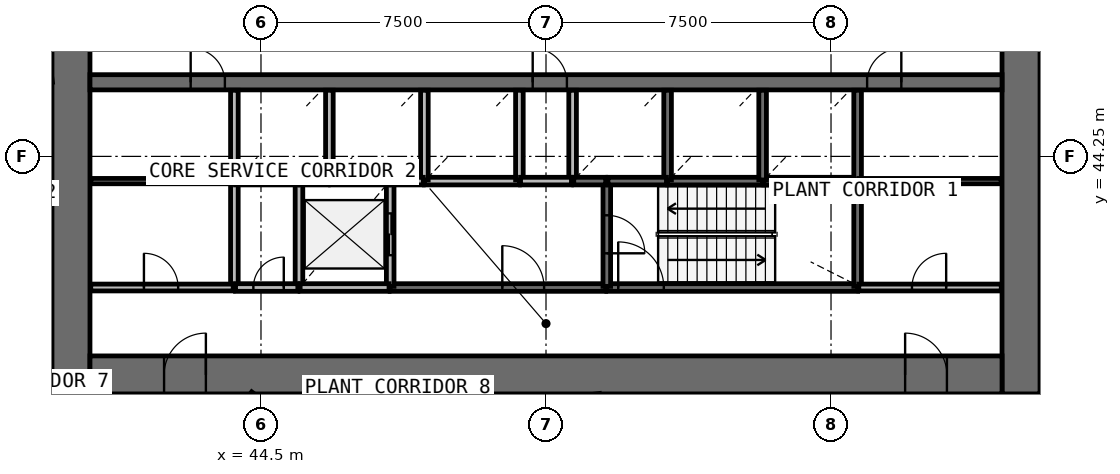
"""IFC4 building model, lengths in metres.
Left out: names, types, materials, properties, quantities, classifications, styles, units other than length and angle.
Written with IfcOpenShell. Run it as: python <this file> out.ifc"""

import sys

from ifc_helpers import new_model, si_unit, direction, frame, frame_2d, origin, place, context, subcontext, project, spatial, rectangle, extrude, source, transform, mapped, element, fill, save


model = new_model("IFC4")
c1 = context("Model", 3, precision=1e-05, world=origin(), true_north=direction((0.0, 1.0)))
c2 = subcontext(c1, "Body", "Model", "MODEL_VIEW")
j1 = project(units=[si_unit("LENGTHUNIT", "METRE"), si_unit("PLANEANGLEUNIT", "RADIAN")], contexts=[c1])
p1 = place(None, origin())
s1 = spatial("IfcSite", under=j1, at=p1, CompositionType="ELEMENT")
p2 = place(p1, origin())
s2 = spatial("IfcBuilding", under=s1, at=p2, CompositionType="ELEMENT")
p3 = place(p2, frame((0.0, 0.0, 75.4)))
s3 = spatial("IfcBuildingStorey", under=s2, at=p3, CompositionType="ELEMENT", Elevation=75.4)
p4 = place(p3, frame((64.5, 38.0, 0.0), z_axis=(0.0, 0.0, 1.0), x_axis=(0.0, 1.0, 0.0)))
e1 = element("IfcWall", 1, at=p4, inside=s3, PredefinedType="SHEAR", context=c2, shape_type="SweptSolid", body=[
    extrude(rectangle(XDim=20.0, YDim=1.0, at=frame_2d((10.0, 0.0))), origin(), (0.0, 0.0, 1.0), 4.4),
])
p5 = place(p4, frame((9.1, 0.0, 0.0)))
e2 = element("IfcOpeningElement", 2, at=p5, cuts=e1, PredefinedType="OPENING", context=c2, shape_type="SweptSolid", body=[
    extrude(rectangle(XDim=1.8, YDim=2.1, at=frame_2d((0.9, 1.05))), frame((0.0, 0.51, 0.0), z_axis=(0.0, -1.0, 0.0), x_axis=(1.0, 0.0, 0.0)), (0.0, 0.0, 1.0), 1.02),
])
p6 = place(p3, frame((39.5, 58.0, 0.0), z_axis=(0.0, 0.0, 1.0), x_axis=(0.0, -1.0, 0.0)))
e3 = element("IfcWall", 3, at=p6, inside=s3, PredefinedType="SHEAR", context=c2, shape_type="SweptSolid", body=[
    extrude(rectangle(XDim=20.0, YDim=1.0, at=frame_2d((10.0, 0.0))), origin(), (0.0, 0.0, 1.0), 4.4),
])
p7 = place(p6, frame((9.1, 0.0, 0.0)))
e4 = element("IfcOpeningElement", 4, at=p7, cuts=e3, PredefinedType="OPENING", context=c2, shape_type="SweptSolid", body=[
    extrude(rectangle(XDim=1.8, YDim=2.1, at=frame_2d((0.9, 1.05))), frame((0.0, 0.51, 0.0), z_axis=(0.0, -1.0, 0.0), x_axis=(1.0, 0.0, 0.0)), (0.0, 0.0, 1.0), 1.02),
])
p8 = place(p3, frame((40.0, 38.5, 0.0), z_axis=(0.0, 0.0, 1.0), x_axis=(1.0, 0.0, 0.0)))
e5 = element("IfcWall", 5, at=p8, inside=s3, PredefinedType="SHEAR", context=c2, shape_type="SweptSolid", body=[
    extrude(rectangle(XDim=24.0, YDim=1.0, at=frame_2d((12.0, 0.0))), origin(), (0.0, 0.0, 1.0), 4.4),
])
p9 = place(p8, frame((21.45, 0.0, 0.0)))
e6 = element("IfcOpeningElement", 6, at=p9, cuts=e5, PredefinedType="OPENING", context=c2, shape_type="SweptSolid", body=[
    extrude(rectangle(XDim=1.1, YDim=2.1, at=frame_2d((0.55, 1.05))), frame((0.0, 0.51, 0.0), z_axis=(0.0, -1.0, 0.0), x_axis=(1.0, 0.0, 0.0)), (0.0, 0.0, 1.0), 1.02),
])
p10 = place(p8, frame((1.95, 0.0, 0.0)))
e7 = element("IfcOpeningElement", 7, at=p10, cuts=e5, PredefinedType="OPENING", context=c2, shape_type="SweptSolid", body=[
    extrude(rectangle(XDim=1.1, YDim=2.1, at=frame_2d((0.55, 1.05))), frame((0.0, 0.51, 0.0), z_axis=(0.0, -1.0, 0.0), x_axis=(1.0, 0.0, 0.0)), (0.0, 0.0, 1.0), 1.02),
])
p11 = place(p3, frame((40.0, 46.2, 0.0), z_axis=(0.0, 0.0, 1.0), x_axis=(1.0, 0.0, 0.0)))
e8 = element("IfcWall", 8, at=p11, inside=s3, PredefinedType="SHEAR", context=c2, shape_type="SweptSolid", body=[
    extrude(rectangle(XDim=24.0, YDim=0.4, at=frame_2d((12.0, 0.0))), origin(), (0.0, 0.0, 1.0), 4.4),
])
p12 = place(p11, frame((20.45, 0.0, 0.0)))
e9 = element("IfcOpeningElement", 9, at=p12, cuts=e8, PredefinedType="OPENING", context=c2, shape_type="SweptSolid", body=[
    extrude(rectangle(XDim=0.9, YDim=2.1, at=frame_2d((0.45, 1.05))), frame((0.0, 0.21, 0.0), z_axis=(0.0, -1.0, 0.0), x_axis=(1.0, 0.0, 0.0)), (0.0, 0.0, 1.0), 0.42),
])
p13 = place(p11, frame((2.65, 0.0, 0.0)))
e10 = element("IfcOpeningElement", 10, at=p13, cuts=e8, PredefinedType="OPENING", context=c2, shape_type="SweptSolid", body=[
    extrude(rectangle(XDim=0.9, YDim=2.1, at=frame_2d((0.45, 1.05))), frame((0.0, 0.21, 0.0), z_axis=(0.0, -1.0, 0.0), x_axis=(1.0, 0.0, 0.0)), (0.0, 0.0, 1.0), 0.42),
])
p14 = place(p11, frame((11.65, 0.0, 0.0)))
e11 = element("IfcOpeningElement", 11, at=p14, cuts=e8, PredefinedType="OPENING", context=c2, shape_type="SweptSolid", body=[
    extrude(rectangle(XDim=0.9, YDim=2.1, at=frame_2d((0.45, 1.05))), frame((0.0, 0.21, 0.0), z_axis=(0.0, -1.0, 0.0), x_axis=(1.0, 0.0, 0.0)), (0.0, 0.0, 1.0), 0.42),
])
p15 = place(p3, frame((53.6, 40.8, 0.0), z_axis=(0.0, 0.0, 1.0), x_axis=(1.0, 0.0, 0.0)))
e12 = element("IfcWall", 12, at=p15, inside=s3, PredefinedType="SOLIDWALL", context=c2, shape_type="SweptSolid", body=[
    extrude(rectangle(XDim=6.6, YDim=0.2, at=frame_2d((3.3, 0.0))), origin(), (0.0, 0.0, 1.0), 4.0),
])
p16 = place(p15, frame((0.3, 0.0, 0.0)))
e13 = element("IfcOpeningElement", 13, at=p16, cuts=e12, PredefinedType="OPENING", context=c2, shape_type="SweptSolid", body=[
    extrude(rectangle(XDim=1.2, YDim=2.1, at=frame_2d((0.6, 1.05))), frame((0.0, 0.11, 0.0), z_axis=(0.0, -1.0, 0.0), x_axis=(1.0, 0.0, 0.0)), (0.0, 0.0, 1.0), 0.22),
])
p17 = place(p3, frame((47.9, 40.8, 0.0), z_axis=(0.0, 0.0, 1.0), x_axis=(1.0, 0.0, 0.0)))
e14 = element("IfcWall", 14, at=p17, inside=s3, PredefinedType="SOLIDWALL", context=c2, shape_type="SweptSolid", body=[
    extrude(rectangle(XDim=5.67, YDim=0.2, at=frame_2d((2.835, 0.0))), origin(), (0.0, 0.0, 1.0), 4.0),
])
p18 = place(p17, frame((2.95, 0.0, 0.0)))
e15 = element("IfcOpeningElement", 15, at=p18, cuts=e14, PredefinedType="OPENING", context=c2, shape_type="SweptSolid", body=[
    extrude(rectangle(XDim=1.1, YDim=2.1, at=frame_2d((0.55, 1.05))), frame((0.0, 0.11, 0.0), z_axis=(0.0, -1.0, 0.0), x_axis=(1.0, 0.0, 0.0)), (0.0, 0.0, 1.0), 0.22),
])
for number, where, z_axis, x_axis in (
    (16, (43.8, 43.6, 0.0), (0.0, 0.0, 1.0), (0.0, -1.0, 0.0)),
    (17, (45.5, 43.6, 0.0), (0.0, 0.0, 1.0), (0.0, -1.0, 0.0)),
):
    element("IfcWall", number, at=place(p3, frame(where, z_axis=z_axis, x_axis=x_axis)), inside=s3, PredefinedType="SOLIDWALL", context=c2, shape_type="SweptSolid", body=[
        extrude(rectangle(XDim=2.8, YDim=0.2, at=frame_2d((1.4, 0.0))), origin(), (0.0, 0.0, 1.0), 4.0),
    ])
p19 = place(p3, frame((47.9, 40.83, 0.0), z_axis=(0.0, 0.0, 1.0), x_axis=(0.0, 1.0, 0.0)))
e18 = element("IfcWall", 18, at=p19, inside=s3, PredefinedType="SOLIDWALL", context=c2, shape_type="SweptSolid", body=[
    extrude(rectangle(XDim=2.77, YDim=0.2, at=frame_2d((1.385, 0.0))), origin(), (0.0, 0.0, 1.0), 4.0),
])
p20 = place(p19, frame((0.82, 0.0, 0.0)))
e19 = element("IfcOpeningElement", 19, at=p20, cuts=e18, PredefinedType="OPENING", context=c2, shape_type="SweptSolid", body=[
    extrude(rectangle(XDim=1.1, YDim=2.1, at=frame_2d((0.55, 1.05))), frame((0.0, 0.11, 0.0), z_axis=(0.0, -1.0, 0.0), x_axis=(1.0, 0.0, 0.0)), (0.0, 0.0, 1.0), 0.22),
])
p21 = place(p3, frame((60.2, 40.83, 0.0), z_axis=(0.0, 0.0, 1.0), x_axis=(0.0, 1.0, 0.0)))
e20 = element("IfcWall", 20, at=p21, inside=s3, PredefinedType="SOLIDWALL", context=c2, shape_type="SweptSolid", body=[
    extrude(rectangle(XDim=2.77, YDim=0.2, at=frame_2d((1.385, 0.0))), origin(), (0.0, 0.0, 1.0), 4.0),
])
p22 = place(p3, frame((53.6, 43.6, 0.0), z_axis=(0.0, 0.0, 1.0), x_axis=(0.0, -1.0, 0.0)))
e21 = element("IfcWall", 21, at=p22, inside=s3, PredefinedType="SOLIDWALL", context=c2, shape_type="SweptSolid", body=[
    extrude(rectangle(XDim=2.77, YDim=0.2, at=frame_2d((1.385, 0.0))), origin(), (0.0, 0.0, 1.0), 4.0),
])
p23 = place(p22, frame((0.9, 0.0, 0.0)))
e22 = element("IfcOpeningElement", 22, at=p23, cuts=e21, PredefinedType="OPENING", context=c2, shape_type="SweptSolid", body=[
    extrude(rectangle(XDim=1.0, YDim=2.1, at=frame_2d((0.5, 1.05))), frame((0.0, 0.11, 0.0), z_axis=(0.0, -1.0, 0.0), x_axis=(1.0, 0.0, 0.0)), (0.0, 0.0, 1.0), 0.22),
])
for number, where, z_axis, x_axis in (
    (23, (48.8, 43.6, 0.0), (0.0, 0.0, 1.0), (1.0, 0.0, 0.0)),
    (24, (55.2, 43.6, 0.0), (0.0, 0.0, 1.0), (1.0, 0.0, 0.0)),
):
    element("IfcWall", number, at=place(p3, frame(where, z_axis=z_axis, x_axis=x_axis)), inside=s3, PredefinedType="SOLIDWALL", context=c2, shape_type="SweptSolid", body=[
        extrude(rectangle(XDim=2.5, YDim=0.2, at=frame_2d((1.25, 0.0))), origin(), (0.0, 0.0, 1.0), 4.0),
    ])
p24 = place(p3, frame((57.73, 43.6, 0.0), z_axis=(0.0, 0.0, 1.0), x_axis=(1.0, 0.0, 0.0)))
e25 = element("IfcWall", 25, at=p24, inside=s3, PredefinedType="SOLIDWALL", context=c2, shape_type="SweptSolid", body=[
    extrude(rectangle(XDim=2.44, YDim=0.2, at=frame_2d((1.22, 0.0))), origin(), (0.0, 0.0, 1.0), 4.0),
])
p25 = place(p3, frame((45.53, 40.8, 0.0), z_axis=(0.0, 0.0, 1.0), x_axis=(1.0, 0.0, 0.0)))
e26 = element("IfcWall", 26, at=p25, inside=s3, PredefinedType="SOLIDWALL", context=c2, shape_type="SweptSolid", body=[
    extrude(rectangle(XDim=2.34, YDim=0.2, at=frame_2d((1.17, 0.0))), origin(), (0.0, 0.0, 1.0), 4.0),
])
p26 = place(p3, frame((43.8, 45.99, 0.0), z_axis=(0.0, 0.0, 1.0), x_axis=(0.0, -1.0, 0.0)))
e27 = element("IfcWall", 27, at=p26, inside=s3, PredefinedType="SOLIDWALL", context=c2, shape_type="SweptSolid", body=[
    extrude(rectangle(XDim=2.36, YDim=0.2, at=frame_2d((1.18, 0.0))), origin(), (0.0, 0.0, 1.0), 4.0),
])
p27 = place(p3, frame((46.3, 43.6, 0.0), z_axis=(0.0, 0.0, 1.0), x_axis=(0.0, 1.0, 0.0)))
e28 = element("IfcWall", 28, at=p27, inside=s3, PredefinedType="SOLIDWALL", context=c2, shape_type="SweptSolid", body=[
    extrude(rectangle(XDim=2.39, YDim=0.2, at=frame_2d((1.195, 0.0))), origin(), (0.0, 0.0, 1.0), 4.0),
])
for number, where, z_axis, x_axis in (
    (29, (48.8, 43.63, 0.0), (0.0, 0.0, 1.0), (0.0, 1.0, 0.0)),
    (30, (51.3, 43.63, 0.0), (0.0, 0.0, 1.0), (0.0, 1.0, 0.0)),
):
    element("IfcWall", number, at=place(p3, frame(where, z_axis=z_axis, x_axis=x_axis)), inside=s3, PredefinedType="SOLIDWALL", context=c2, shape_type="SweptSolid", body=[
        extrude(rectangle(XDim=2.36, YDim=0.2, at=frame_2d((1.18, 0.0))), origin(), (0.0, 0.0, 1.0), 4.0),
    ])
p28 = place(p3, frame((52.7, 45.99, 0.0), z_axis=(0.0, 0.0, 1.0), x_axis=(0.0, -1.0, 0.0)))
e31 = element("IfcWall", 31, at=p28, inside=s3, PredefinedType="SOLIDWALL", context=c2, shape_type="SweptSolid", body=[
    extrude(rectangle(XDim=2.39, YDim=0.2, at=frame_2d((1.195, 0.0))), origin(), (0.0, 0.0, 1.0), 4.0),
])
for number, where, z_axis, x_axis in (
    (32, (55.2, 43.63, 0.0), (0.0, 0.0, 1.0), (0.0, 1.0, 0.0)),
    (33, (57.7, 43.63, 0.0), (0.0, 0.0, 1.0), (0.0, 1.0, 0.0)),
    (34, (60.2, 43.63, 0.0), (0.0, 0.0, 1.0), (0.0, 1.0, 0.0)),
):
    element("IfcWall", number, at=place(p3, frame(where, z_axis=z_axis, x_axis=x_axis)), inside=s3, PredefinedType="SOLIDWALL", context=c2, shape_type="SweptSolid", body=[
        extrude(rectangle(XDim=2.36, YDim=0.2, at=frame_2d((1.18, 0.0))), origin(), (0.0, 0.0, 1.0), 4.0),
    ])
p29 = place(p3, frame((43.83, 43.6, 0.0), z_axis=(0.0, 0.0, 1.0), x_axis=(1.0, 0.0, 0.0)))
e35 = element("IfcWall", 35, at=p29, inside=s3, PredefinedType="SOLIDWALL", context=c2, shape_type="SweptSolid", body=[
    extrude(rectangle(XDim=1.64, YDim=0.2, at=frame_2d((0.82, 0.0))), origin(), (0.0, 0.0, 1.0), 4.0),
])
p30 = place(p3, frame((43.83, 40.8, 0.0), z_axis=(0.0, 0.0, 1.0), x_axis=(1.0, 0.0, 0.0)))
e36 = element("IfcWall", 36, at=p30, inside=s3, PredefinedType="SOLIDWALL", context=c2, shape_type="SweptSolid", body=[
    extrude(rectangle(XDim=1.64, YDim=0.2, at=frame_2d((0.82, 0.0))), origin(), (0.0, 0.0, 1.0), 4.0),
])
p31 = place(p30, frame((0.47, 0.0, 0.0)))
e37 = element("IfcOpeningElement", 37, at=p31, cuts=e36, PredefinedType="OPENING", context=c2, shape_type="SweptSolid", body=[
    extrude(rectangle(XDim=0.8, YDim=2.1, at=frame_2d((0.4, 1.05))), frame((0.0, 0.11, 0.0), z_axis=(0.0, -1.0, 0.0), x_axis=(1.0, 0.0, 0.0)), (0.0, 0.0, 1.0), 0.22),
])
for number, where, z_axis, x_axis in (
    (38, (46.33, 43.6, 0.0), (0.0, 0.0, 1.0), (1.0, 0.0, 0.0)),
    (39, (53.63, 43.6, 0.0), (0.0, 0.0, 1.0), (1.0, 0.0, 0.0)),
):
    element("IfcWall", number, at=place(p3, frame(where, z_axis=z_axis, x_axis=x_axis)), inside=s3, PredefinedType="SOLIDWALL", context=c2, shape_type="SweptSolid", body=[
        extrude(rectangle(XDim=1.54, YDim=0.2, at=frame_2d((0.77, 0.0))), origin(), (0.0, 0.0, 1.0), 4.0),
    ])
p32 = place(p3, frame((52.67, 43.6, 0.0), z_axis=(0.0, 0.0, 1.0), x_axis=(-1.0, 0.0, 0.0)))
e40 = element("IfcWall", 40, at=p32, inside=s3, PredefinedType="SOLIDWALL", context=c2, shape_type="SweptSolid", body=[
    extrude(rectangle(XDim=1.34, YDim=0.2, at=frame_2d((0.67, 0.0))), origin(), (0.0, 0.0, 1.0), 4.0),
])
for number, where, z_axis, x_axis in (
    (41, (47.93, 43.6, 0.0), (0.0, 0.0, 1.0), (1.0, 0.0, 0.0)),
    (42, (52.73, 43.6, 0.0), (0.0, 0.0, 1.0), (1.0, 0.0, 0.0)),
):
    element("IfcWall", number, at=place(p3, frame(where, z_axis=z_axis, x_axis=x_axis)), inside=s3, PredefinedType="SOLIDWALL", context=c2, shape_type="SweptSolid", body=[
        extrude(rectangle(XDim=0.84, YDim=0.2, at=frame_2d((0.42, 0.0))), origin(), (0.0, 0.0, 1.0), 4.0),
    ])
p33 = place(p3, frame((45.53, 43.6, 0.0), z_axis=(0.0, 0.0, 1.0), x_axis=(1.0, 0.0, 0.0)))
e43 = element("IfcWall", 43, at=p33, inside=s3, PredefinedType="SOLIDWALL", context=c2, shape_type="SweptSolid", body=[
    extrude(rectangle(XDim=0.74, YDim=0.2, at=frame_2d((0.37, 0.0))), origin(), (0.0, 0.0, 1.0), 4.0),
])
p34 = place(p3, frame((40.02, 40.8, 0.0), z_axis=(0.0, 0.0, 1.0), x_axis=(1.0, 0.0, 0.0)))
e44 = element("IfcWall", 44, at=p34, inside=s3, PredefinedType="PARTITIONING", context=c2, shape_type="SweptSolid", body=[
    extrude(rectangle(XDim=3.75, YDim=0.18, at=frame_2d((1.875, 0.0))), origin(), (0.0, 0.0, 1.0), 4.0),
])
p35 = place(p34, frame((1.4, 0.0, 0.0)))
e45 = element("IfcOpeningElement", 45, at=p35, cuts=e44, PredefinedType="OPENING", context=c2, shape_type="SweptSolid", body=[
    extrude(rectangle(XDim=0.9, YDim=2.1, at=frame_2d((0.45, 1.05))), frame((0.0, 0.1, 0.0), z_axis=(0.0, -1.0, 0.0), x_axis=(1.0, 0.0, 0.0)), (0.0, 0.0, 1.0), 0.2),
])
p36 = place(p3, frame((60.23, 40.8, 0.0), z_axis=(0.0, 0.0, 1.0), x_axis=(1.0, 0.0, 0.0)))
e46 = element("IfcWall", 46, at=p36, inside=s3, PredefinedType="PARTITIONING", context=c2, shape_type="SweptSolid", body=[
    extrude(rectangle(XDim=3.75, YDim=0.18, at=frame_2d((1.875, 0.0))), origin(), (0.0, 0.0, 1.0), 4.0),
])
p37 = place(p36, frame((1.4, 0.0, 0.0)))
e47 = element("IfcOpeningElement", 47, at=p37, cuts=e46, PredefinedType="OPENING", context=c2, shape_type="SweptSolid", body=[
    extrude(rectangle(XDim=0.9, YDim=2.1, at=frame_2d((0.45, 1.05))), frame((0.0, 0.1, 0.0), z_axis=(0.0, -1.0, 0.0), x_axis=(1.0, 0.0, 0.0)), (0.0, 0.0, 1.0), 0.2),
])
p38 = place(p3, frame((42.554, 35.69, 0.0), z_axis=(0.0, 0.0, 1.0), x_axis=(0.608737787706, 0.793371480341, 0.0)))
e48 = element("IfcWall", 48, at=p38, inside=s3, PredefinedType="PARTITIONING", context=c2, shape_type="SweptSolid", body=[
    extrude(rectangle(XDim=2.912, YDim=0.18, at=frame_2d((1.456, 0.0))), origin(), (0.0, 0.0, 1.0), 2.8),
])
p39 = place(p38, frame((0.862, 0.0, 0.0)))
e49 = element("IfcOpeningElement", 49, at=p39, cuts=e48, PredefinedType="OPENING", context=c2, shape_type="SweptSolid", body=[
    extrude(rectangle(XDim=1.2, YDim=2.1, at=frame_2d((0.6, 1.05))), frame((0.0, 0.1, 0.0), z_axis=(0.0, -1.0, 0.0), x_axis=(1.0, 0.0, 0.0)), (0.0, 0.0, 1.0), 0.2),
])
p40 = place(p3, frame((36.69, 45.984, 0.0), z_axis=(0.0, 0.0, 1.0), x_axis=(0.991440737811, 0.130557509967, 0.0)))
e50 = element("IfcWall", 50, at=p40, inside=s3, PredefinedType="PARTITIONING", context=c2, shape_type="SweptSolid", body=[
    extrude(rectangle(XDim=2.33, YDim=0.18, at=frame_2d((1.165, 0.0))), origin(), (0.0, 0.0, 1.0), 2.8),
])
p41 = place(p40, frame((0.48, 0.0, 0.0)))
e51 = element("IfcOpeningElement", 51, at=p41, cuts=e50, PredefinedType="OPENING", context=c2, shape_type="SweptSolid", body=[
    extrude(rectangle(XDim=1.2, YDim=2.1, at=frame_2d((0.6, 1.05))), frame((0.0, 0.1, 0.0), z_axis=(0.0, -1.0, 0.0), x_axis=(1.0, 0.0, 0.0)), (0.0, 0.0, 1.0), 0.2),
])
p42 = place(p3, frame((53.629, 35.63, 0.0), z_axis=(0.0, 0.0, 1.0), x_axis=(-0.13060507681, 0.991434472828, 0.0)))
e52 = element("IfcWall", 52, at=p42, inside=s3, PredefinedType="PARTITIONING", context=c2, shape_type="SweptSolid", body=[
    extrude(rectangle(XDim=2.391, YDim=0.18, at=frame_2d((1.195, 0.0))), origin(), (0.0, 0.0, 1.0), 2.8),
])
p43 = place(p42, frame((0.541, 0.0, 0.0)))
e53 = element("IfcOpeningElement", 53, at=p43, cuts=e52, PredefinedType="OPENING", context=c2, shape_type="SweptSolid", body=[
    extrude(rectangle(XDim=1.2, YDim=2.1, at=frame_2d((0.6, 1.05))), frame((0.0, 0.1, 0.0), z_axis=(0.0, -1.0, 0.0), x_axis=(1.0, 0.0, 0.0)), (0.0, 0.0, 1.0), 0.2),
])
p44 = place(p3, frame((66.832, 36.619, 0.0), z_axis=(0.0, 0.0, 1.0), x_axis=(-0.793393624489, 0.608708926023, 0.0)))
e54 = element("IfcWall", 54, at=p44, inside=s3, PredefinedType="PARTITIONING", context=c2, shape_type="SweptSolid", body=[
    extrude(rectangle(XDim=2.309, YDim=0.18, at=frame_2d((1.155, 0.0))), origin(), (0.0, 0.0, 1.0), 2.8),
])
p45 = place(p44, frame((0.459, 0.0, 0.0)))
e55 = element("IfcOpeningElement", 55, at=p45, cuts=e54, PredefinedType="OPENING", context=c2, shape_type="SweptSolid", body=[
    extrude(rectangle(XDim=1.2, YDim=2.1, at=frame_2d((0.6, 1.05))), frame((0.0, 0.1, 0.0), z_axis=(0.0, -1.0, 0.0), x_axis=(1.0, 0.0, 0.0)), (0.0, 0.0, 1.0), 0.2),
])
for number, where, z_axis, x_axis in (
    (56, (43.77, 43.6, 0.0), (0.0, 0.0, 1.0), (-1.0, 0.0, 0.0)),
    (57, (60.23, 43.6, 0.0), (0.0, 0.0, 1.0), (1.0, 0.0, 0.0)),
):
    element("IfcWall", number, at=place(p3, frame(where, z_axis=z_axis, x_axis=x_axis)), inside=s3, PredefinedType="PARTITIONING", context=c2, shape_type="SweptSolid", body=[
        extrude(rectangle(XDim=3.75, YDim=0.14, at=frame_2d((1.875, 0.0))), origin(), (0.0, 0.0, 1.0), 3.1),
    ])
m1 = source(origin(), c2, "Body", "SweptSolid", [
    extrude(rectangle(XDim=1.1, YDim=2.1, at=frame_2d((0.55, 1.05))), frame((0.0, 0.025, 0.0), z_axis=(0.0, -1.0, 0.0), x_axis=(1.0, 0.0, 0.0)), (0.0, 0.0, 1.0), 0.05),
])
p46 = place(p20, origin())
e58 = element("IfcDoor", 58, at=p46, inside=s3, OperationType="DOUBLE_DOOR_SLIDING", PredefinedType="USERDEFINED", context=c2, shape_type="MappedRepresentation", body=[
    mapped(m1, transform((0.0, 0.0, 0.0), scale=1.0)),
])
fill(e19, e58)
m2 = source(origin(), c2, "Body", "SweptSolid", [
    extrude(rectangle(XDim=1.2, YDim=2.1, at=frame_2d((0.6, 1.05))), frame((0.0, 0.025, 0.0), z_axis=(0.0, -1.0, 0.0), x_axis=(1.0, 0.0, 0.0)), (0.0, 0.0, 1.0), 0.05),
])
p47 = place(p16, origin())
e59 = element("IfcDoor", 59, at=p47, inside=s3, OperationType="SINGLE_SWING_LEFT", PredefinedType="DOOR", context=c2, shape_type="MappedRepresentation", body=[
    mapped(m2, transform((0.0, 0.0, 0.0), scale=1.0)),
])
fill(e13, e59)
m3 = source(origin(), c2, "Body", "SweptSolid", [
    extrude(rectangle(XDim=1.0, YDim=2.1, at=frame_2d((0.5, 1.05))), frame((0.0, 0.025, 0.0), z_axis=(0.0, -1.0, 0.0), x_axis=(1.0, 0.0, 0.0)), (0.0, 0.0, 1.0), 0.05),
])
p48 = place(p23, origin())
e60 = element("IfcDoor", 60, at=p48, inside=s3, OperationType="SINGLE_SWING_RIGHT", PredefinedType="DOOR", context=c2, shape_type="MappedRepresentation", body=[
    mapped(m3, transform((0.0, 0.0, 0.0), scale=1.0)),
])
fill(e22, e60)
m4 = source(origin(), c2, "Body", "SweptSolid", [
    extrude(rectangle(XDim=1.1, YDim=2.1, at=frame_2d((0.55, 1.05))), frame((0.0, 0.025, 0.0), z_axis=(0.0, -1.0, 0.0), x_axis=(1.0, 0.0, 0.0)), (0.0, 0.0, 1.0), 0.05),
])
p49 = place(p18, origin())
e61 = element("IfcDoor", 61, at=p49, inside=s3, OperationType="SINGLE_SWING_LEFT", PredefinedType="DOOR", context=c2, shape_type="MappedRepresentation", body=[
    mapped(m4, transform((0.0, 0.0, 0.0), scale=1.0)),
])
fill(e15, e61)
m5 = source(origin(), c2, "Body", "SweptSolid", [
    extrude(rectangle(XDim=0.8, YDim=2.1, at=frame_2d((0.4, 1.05))), frame((0.0, 0.025, 0.0), z_axis=(0.0, -1.0, 0.0), x_axis=(1.0, 0.0, 0.0)), (0.0, 0.0, 1.0), 0.05),
])
p50 = place(p31, origin())
e62 = element("IfcDoor", 62, at=p50, inside=s3, OperationType="SINGLE_SWING_RIGHT", PredefinedType="DOOR", context=c2, shape_type="MappedRepresentation", body=[
    mapped(m5, transform((0.0, 0.0, 0.0), scale=1.0)),
])
fill(e37, e62)
m6 = source(origin(), c2, "Body", "SweptSolid", [
    extrude(rectangle(XDim=1.1, YDim=2.1, at=frame_2d((0.55, 1.05))), frame((0.0, 0.025, 0.0), z_axis=(0.0, -1.0, 0.0), x_axis=(1.0, 0.0, 0.0)), (0.0, 0.0, 1.0), 0.05),
])
p51 = place(p9, origin())
e63 = element("IfcDoor", 63, at=p51, inside=s3, OperationType="SINGLE_SWING_LEFT", PredefinedType="DOOR", context=c2, shape_type="MappedRepresentation", body=[
    mapped(m6, transform((0.0, 0.0, 0.0), scale=1.0)),
])
fill(e6, e63)
p52 = place(p10, origin())
e64 = element("IfcDoor", 64, at=p52, inside=s3, OperationType="SINGLE_SWING_RIGHT", PredefinedType="DOOR", context=c2, shape_type="MappedRepresentation", body=[
    mapped(m6, transform((0.0, 0.0, 0.0), scale=1.0)),
])
fill(e7, e64)
m7 = source(origin(), c2, "Body", "SweptSolid", [
    extrude(rectangle(XDim=0.9, YDim=2.1, at=frame_2d((0.45, 1.05))), frame((0.0, 0.025, 0.0), z_axis=(0.0, -1.0, 0.0), x_axis=(1.0, 0.0, 0.0)), (0.0, 0.0, 1.0), 0.05),
])
p53 = place(p35, origin())
e65 = element("IfcDoor", 65, at=p53, inside=s3, OperationType="SINGLE_SWING_LEFT", PredefinedType="DOOR", context=c2, shape_type="MappedRepresentation", body=[
    mapped(m7, transform((0.0, 0.0, 0.0), scale=1.0)),
])
fill(e45, e65)
p54 = place(p12, origin())
e66 = element("IfcDoor", 66, at=p54, inside=s3, OperationType="SINGLE_SWING_RIGHT", PredefinedType="DOOR", context=c2, shape_type="MappedRepresentation", body=[
    mapped(m7, transform((0.0, 0.0, 0.0), scale=1.0)),
])
fill(e9, e66)
p55 = place(p37, origin())
e67 = element("IfcDoor", 67, at=p55, inside=s3, OperationType="SINGLE_SWING_RIGHT", PredefinedType="DOOR", context=c2, shape_type="MappedRepresentation", body=[
    mapped(m7, transform((0.0, 0.0, 0.0), scale=1.0)),
])
fill(e47, e67)
p56 = place(p13, origin())
e68 = element("IfcDoor", 68, at=p56, inside=s3, OperationType="SINGLE_SWING_LEFT", PredefinedType="DOOR", context=c2, shape_type="MappedRepresentation", body=[
    mapped(m7, transform((0.0, 0.0, 0.0), scale=1.0)),
])
fill(e10, e68)
p57 = place(p14, origin())
e69 = element("IfcDoor", 69, at=p57, inside=s3, OperationType="SINGLE_SWING_LEFT", PredefinedType="DOOR", context=c2, shape_type="MappedRepresentation", body=[
    mapped(m7, transform((0.0, 0.0, 0.0), scale=1.0)),
])
fill(e11, e69)
save(model, sys.argv[1])
